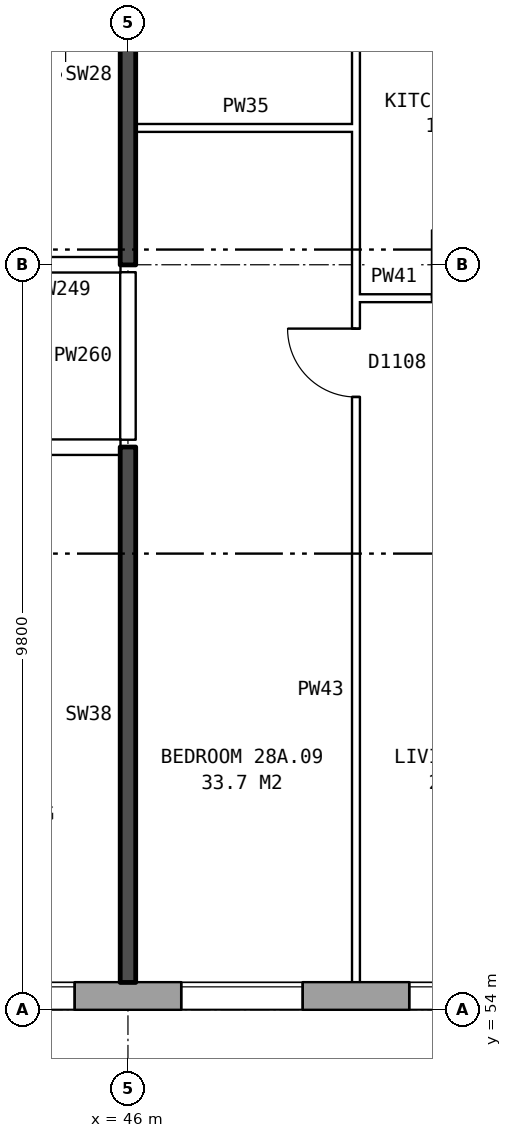
"""IFC4 building model, lengths in metres.
Left out: names, types, materials, properties, quantities, classifications, styles, units other than length and angle.
Written with IfcOpenShell. Run it as: python <this file> out.ifc"""

import sys

from ifc_helpers import new_model, si_unit, direction, frame, frame_2d, origin, place, context, subcontext, project, spatial, rectangle, extrude, element, fill, save


model = new_model("IFC4")
c1 = context("Model", 3, precision=1e-05, world=origin(), true_north=direction((0.0, 1.0)))
c2 = subcontext(c1, "Body", "Model", "MODEL_VIEW")
j1 = project(units=[si_unit("LENGTHUNIT", "METRE"), si_unit("PLANEANGLEUNIT", "RADIAN")], contexts=[c1])
p1 = place(None, origin())
s1 = spatial("IfcSite", under=j1, at=p1, CompositionType="ELEMENT")
p2 = place(p1, origin())
s2 = spatial("IfcBuilding", under=s1, at=p2, CompositionType="ELEMENT")
p3 = place(p2, frame((0.0, 0.0, 102.6)))
s3 = spatial("IfcBuildingStorey", under=s2, at=p3, CompositionType="ELEMENT", Elevation=102.6)
p4 = place(p3, frame((28.075, 54.18, 0.0), z_axis=(0.0, 0.0, 1.0), x_axis=(1.0, 0.0, 0.0)))
e1 = element("IfcWall", 1, at=p4, inside=s3, PredefinedType="STANDARD", context=c2, shape_type="SweptSolid", body=[
    extrude(rectangle(XDim=44.851, YDim=0.36, at=frame_2d((22.425, 0.0))), origin(), (0.0, 0.0, 1.0), 2.85),
])
p5 = place(p4, frame((0.625, 0.0, 0.8)))
e2 = element("IfcOpeningElement", 2, at=p5, cuts=e1, PredefinedType="OPENING", context=c2, shape_type="SweptSolid", body=[
    extrude(rectangle(XDim=1.6, YDim=1.8, at=frame_2d((0.8, 0.9))), frame((0.0, 0.19, 0.0), z_axis=(0.0, -1.0, 0.0), x_axis=(1.0, 0.0, 0.0)), (0.0, 0.0, 1.0), 0.38),
])
p6 = place(p4, frame((3.625, 0.0, 0.8)))
e3 = element("IfcOpeningElement", 3, at=p6, cuts=e1, PredefinedType="OPENING", context=c2, shape_type="SweptSolid", body=[
    extrude(rectangle(XDim=1.6, YDim=1.8, at=frame_2d((0.8, 0.9))), frame((0.0, 0.19, 0.0), z_axis=(0.0, -1.0, 0.0), x_axis=(1.0, 0.0, 0.0)), (0.0, 0.0, 1.0), 0.38),
])
p7 = place(p4, frame((6.125, 0.0, 1.0)))
e4 = element("IfcOpeningElement", 4, at=p7, cuts=e1, PredefinedType="OPENING", context=c2, shape_type="SweptSolid", body=[
    extrude(rectangle(XDim=0.6, YDim=1.5, at=frame_2d((0.3, 0.75))), frame((0.0, 0.19, 0.0), z_axis=(0.0, -1.0, 0.0), x_axis=(1.0, 0.0, 0.0)), (0.0, 0.0, 1.0), 0.38),
])
p8 = place(p4, frame((7.025, 0.0, 1.7)))
e5 = element("IfcOpeningElement", 5, at=p8, cuts=e1, PredefinedType="OPENING", context=c2, shape_type="SweptSolid", body=[
    extrude(rectangle(XDim=0.6, YDim=0.9, at=frame_2d((0.3, 0.45))), frame((0.0, 0.19, 0.0), z_axis=(0.0, -1.0, 0.0), x_axis=(1.0, 0.0, 0.0)), (0.0, 0.0, 1.0), 0.38),
])
p9 = place(p4, frame((12.625, 0.0, 0.8)))
e6 = element("IfcOpeningElement", 6, at=p9, cuts=e1, PredefinedType="OPENING", context=c2, shape_type="SweptSolid", body=[
    extrude(rectangle(XDim=1.6, YDim=1.8, at=frame_2d((0.8, 0.9))), frame((0.0, 0.19, 0.0), z_axis=(0.0, -1.0, 0.0), x_axis=(1.0, 0.0, 0.0)), (0.0, 0.0, 1.0), 0.38),
])
p10 = place(p4, frame((15.625, 0.0, 0.8)))
e7 = element("IfcOpeningElement", 7, at=p10, cuts=e1, PredefinedType="OPENING", context=c2, shape_type="SweptSolid", body=[
    extrude(rectangle(XDim=1.6, YDim=1.8, at=frame_2d((0.8, 0.9))), frame((0.0, 0.19, 0.0), z_axis=(0.0, -1.0, 0.0), x_axis=(1.0, 0.0, 0.0)), (0.0, 0.0, 1.0), 0.38),
])
p11 = place(p4, frame((18.625, 0.0, 0.8)))
e8 = element("IfcOpeningElement", 8, at=p11, cuts=e1, PredefinedType="OPENING", context=c2, shape_type="SweptSolid", body=[
    extrude(rectangle(XDim=1.6, YDim=1.8, at=frame_2d((0.8, 0.9))), frame((0.0, 0.19, 0.0), z_axis=(0.0, -1.0, 0.0), x_axis=(1.0, 0.0, 0.0)), (0.0, 0.0, 1.0), 0.38),
])
p12 = place(p4, frame((21.625, 0.0, 0.8)))
e9 = element("IfcOpeningElement", 9, at=p12, cuts=e1, PredefinedType="OPENING", context=c2, shape_type="SweptSolid", body=[
    extrude(rectangle(XDim=1.6, YDim=1.8, at=frame_2d((0.8, 0.9))), frame((0.0, 0.19, 0.0), z_axis=(0.0, -1.0, 0.0), x_axis=(1.0, 0.0, 0.0)), (0.0, 0.0, 1.0), 0.38),
])
p13 = place(p4, frame((24.625, 0.0, 0.8)))
e10 = element("IfcOpeningElement", 10, at=p13, cuts=e1, PredefinedType="OPENING", context=c2, shape_type="SweptSolid", body=[
    extrude(rectangle(XDim=1.6, YDim=1.8, at=frame_2d((0.8, 0.9))), frame((0.0, 0.19, 0.0), z_axis=(0.0, -1.0, 0.0), x_axis=(1.0, 0.0, 0.0)), (0.0, 0.0, 1.0), 0.38),
])
p14 = place(p4, frame((27.625, 0.0, 0.8)))
e11 = element("IfcOpeningElement", 11, at=p14, cuts=e1, PredefinedType="OPENING", context=c2, shape_type="SweptSolid", body=[
    extrude(rectangle(XDim=1.6, YDim=1.8, at=frame_2d((0.8, 0.9))), frame((0.0, 0.19, 0.0), z_axis=(0.0, -1.0, 0.0), x_axis=(1.0, 0.0, 0.0)), (0.0, 0.0, 1.0), 0.38),
])
p15 = place(p4, frame((30.625, 0.0, 0.8)))
e12 = element("IfcOpeningElement", 12, at=p15, cuts=e1, PredefinedType="OPENING", context=c2, shape_type="SweptSolid", body=[
    extrude(rectangle(XDim=1.6, YDim=1.8, at=frame_2d((0.8, 0.9))), frame((0.0, 0.19, 0.0), z_axis=(0.0, -1.0, 0.0), x_axis=(1.0, 0.0, 0.0)), (0.0, 0.0, 1.0), 0.38),
])
p16 = place(p4, frame((33.075, 0.0, 0.8)))
e13 = element("IfcOpeningElement", 13, at=p16, cuts=e1, PredefinedType="OPENING", context=c2, shape_type="SweptSolid", body=[
    extrude(rectangle(XDim=1.6, YDim=1.8, at=frame_2d((0.8, 0.9))), frame((0.0, 0.19, 0.0), z_axis=(0.0, -1.0, 0.0), x_axis=(1.0, 0.0, 0.0)), (0.0, 0.0, 1.0), 0.38),
])
p17 = place(p4, frame((37.175, 0.0, 1.7)))
e14 = element("IfcOpeningElement", 14, at=p17, cuts=e1, PredefinedType="OPENING", context=c2, shape_type="SweptSolid", body=[
    extrude(rectangle(XDim=1.0, YDim=0.9, at=frame_2d((0.5, 0.45))), frame((0.0, 0.19, 0.0), z_axis=(0.0, -1.0, 0.0), x_axis=(1.0, 0.0, 0.0)), (0.0, 0.0, 1.0), 0.38),
])
p18 = place(p4, frame((39.625, 0.0, 0.8)))
e15 = element("IfcOpeningElement", 15, at=p18, cuts=e1, PredefinedType="OPENING", context=c2, shape_type="SweptSolid", body=[
    extrude(rectangle(XDim=1.6, YDim=1.8, at=frame_2d((0.8, 0.9))), frame((0.0, 0.19, 0.0), z_axis=(0.0, -1.0, 0.0), x_axis=(1.0, 0.0, 0.0)), (0.0, 0.0, 1.0), 0.38),
])
p19 = place(p4, frame((42.625, 0.0, 0.8)))
e16 = element("IfcOpeningElement", 16, at=p19, cuts=e1, PredefinedType="OPENING", context=c2, shape_type="SweptSolid", body=[
    extrude(rectangle(XDim=1.6, YDim=1.8, at=frame_2d((0.8, 0.9))), frame((0.0, 0.19, 0.0), z_axis=(0.0, -1.0, 0.0), x_axis=(1.0, 0.0, 0.0)), (0.0, 0.0, 1.0), 0.38),
])
p20 = place(p4, frame((8.925, 0.0, 0.8)))
e17 = element("IfcOpeningElement", 17, at=p20, cuts=e1, PredefinedType="OPENING", context=c2, shape_type="SweptSolid", body=[
    extrude(rectangle(XDim=1.0, YDim=0.9, at=frame_2d((0.5, 0.45))), frame((0.0, 0.19, 0.0), z_axis=(0.0, -1.0, 0.0), x_axis=(1.0, 0.0, 0.0)), (0.0, 0.0, 1.0), 0.38),
])
p21 = place(p4, frame((10.225, 0.0, 0.8)))
e18 = element("IfcOpeningElement", 18, at=p21, cuts=e1, PredefinedType="OPENING", context=c2, shape_type="SweptSolid", body=[
    extrude(rectangle(XDim=1.4, YDim=1.8, at=frame_2d((0.7, 0.9))), frame((0.0, 0.19, 0.0), z_axis=(0.0, -1.0, 0.0), x_axis=(1.0, 0.0, 0.0)), (0.0, 0.0, 1.0), 0.38),
])
p22 = place(p4, frame((34.975, 0.0, 0.8)))
e19 = element("IfcOpeningElement", 19, at=p22, cuts=e1, PredefinedType="OPENING", context=c2, shape_type="SweptSolid", body=[
    extrude(rectangle(XDim=0.6, YDim=0.9, at=frame_2d((0.3, 0.45))), frame((0.0, 0.19, 0.0), z_axis=(0.0, -1.0, 0.0), x_axis=(1.0, 0.0, 0.0)), (0.0, 0.0, 1.0), 0.38),
])
p23 = place(p4, frame((38.475, 0.0, 0.8)))
e20 = element("IfcOpeningElement", 20, at=p23, cuts=e1, PredefinedType="OPENING", context=c2, shape_type="SweptSolid", body=[
    extrude(rectangle(XDim=0.8, YDim=1.8, at=frame_2d((0.4, 0.9))), frame((0.0, 0.19, 0.0), z_axis=(0.0, -1.0, 0.0), x_axis=(1.0, 0.0, 0.0)), (0.0, 0.0, 1.0), 0.38),
])
p24 = place(p3, frame((25.36, 61.4, 0.0), z_axis=(0.0, 0.0, 1.0), x_axis=(1.0, 0.0, 0.0)))
e21 = element("IfcWall", 21, at=p24, inside=s3, PredefinedType="PARTITIONING", context=c2, shape_type="SweptSolid", body=[
    extrude(rectangle(XDim=20.54, YDim=0.2, at=frame_2d((10.27, 0.0))), origin(), (0.0, 0.0, 1.0), 2.85),
])
p25 = place(p24, frame((18.09, 0.0, 0.0)))
e22 = element("IfcOpeningElement", 22, at=p25, cuts=e21, PredefinedType="OPENING", context=c2, shape_type="SweptSolid", body=[
    extrude(rectangle(XDim=1.0, YDim=2.1, at=frame_2d((0.5, 1.05))), frame((0.0, 0.11, 0.0), z_axis=(0.0, -1.0, 0.0), x_axis=(1.0, 0.0, 0.0)), (0.0, 0.0, 1.0), 0.22),
])
p26 = place(p24, frame((12.14, 0.0, 0.0)))
e23 = element("IfcOpeningElement", 23, at=p26, cuts=e21, PredefinedType="OPENING", context=c2, shape_type="SweptSolid", body=[
    extrude(rectangle(XDim=1.0, YDim=2.1, at=frame_2d((0.5, 1.05))), frame((0.0, 0.11, 0.0), z_axis=(0.0, -1.0, 0.0), x_axis=(1.0, 0.0, 0.0)), (0.0, 0.0, 1.0), 0.22),
])
p27 = place(p24, frame((2.62, 0.0, 0.0)))
e24 = element("IfcOpeningElement", 24, at=p27, cuts=e21, PredefinedType="OPENING", context=c2, shape_type="SweptSolid", body=[
    extrude(rectangle(XDim=1.0, YDim=2.1, at=frame_2d((0.5, 1.05))), frame((0.0, 0.11, 0.0), z_axis=(0.0, -1.0, 0.0), x_axis=(1.0, 0.0, 0.0)), (0.0, 0.0, 1.0), 0.22),
])
p28 = place(p3, frame((49.0, 63.36, 0.0), z_axis=(0.0, 0.0, 1.0), x_axis=(1.0, 0.0, 0.0)))
e25 = element("IfcWall", 25, at=p28, inside=s3, PredefinedType="PARTITIONING", context=c2, shape_type="SweptSolid", body=[
    extrude(rectangle(XDim=2.9, YDim=0.1, at=frame_2d((1.45, 0.0))), origin(), (0.0, 0.0, 1.0), 2.85),
])
p29 = place(p28, frame((1.0, 0.0, 0.0)))
e26 = element("IfcOpeningElement", 26, at=p29, cuts=e25, PredefinedType="OPENING", context=c2, shape_type="SweptSolid", body=[
    extrude(rectangle(XDim=0.9, YDim=2.1, at=frame_2d((0.45, 1.05))), frame((0.0, 0.06, 0.0), z_axis=(0.0, -1.0, 0.0), x_axis=(1.0, 0.0, 0.0)), (0.0, 0.0, 1.0), 0.12),
])
p30 = place(p3, frame((44.36, 63.8, 0.0), z_axis=(0.0, 0.0, 1.0), x_axis=(1.0, 0.0, 0.0)))
e27 = element("IfcWall", 27, at=p30, inside=s3, PredefinedType="PARTITIONING", context=c2, shape_type="SweptSolid", body=[
    extrude(rectangle(XDim=1.54, YDim=0.2, at=frame_2d((0.77, 0.0))), origin(), (0.0, 0.0, 1.0), 2.85),
])
p31 = place(p3, frame((46.1, 65.6, 0.0), z_axis=(0.0, 0.0, 1.0), x_axis=(1.0, 0.0, 0.0)))
e28 = element("IfcWall", 28, at=p31, inside=s3, PredefinedType="PARTITIONING", context=c2, shape_type="SweptSolid", body=[
    extrude(rectangle(XDim=2.9, YDim=0.1, at=frame_2d((1.45, 0.0))), origin(), (0.0, 0.0, 1.0), 2.85),
])
p32 = place(p3, frame((46.0, 54.36, 0.0), z_axis=(0.0, 0.0, 1.0), x_axis=(0.0, 1.0, 0.0)))
e29 = element("IfcWall", 29, at=p32, inside=s3, PredefinedType="SOLIDWALL", context=c2, shape_type="SweptSolid", body=[
    extrude(rectangle(XDim=7.04, YDim=0.2, at=frame_2d((3.52, 0.0))), origin(), (0.0, 0.0, 1.0), 2.85),
])
p33 = place(p3, frame((46.0, 61.5, 0.0), z_axis=(0.0, 0.0, 1.0), x_axis=(0.0, 1.0, 0.0)))
e30 = element("IfcWall", 30, at=p33, inside=s3, PredefinedType="PARTITIONING", context=c2, shape_type="SweptSolid", body=[
    extrude(rectangle(XDim=2.2, YDim=0.2, at=frame_2d((1.1, 0.0))), origin(), (0.0, 0.0, 1.0), 2.85),
])
p34 = place(p3, frame((46.0, 63.8, 0.0), z_axis=(0.0, 0.0, 1.0), x_axis=(0.0, 1.0, 0.0)))
e31 = element("IfcWall", 31, at=p34, inside=s3, PredefinedType="SOLIDWALL", context=c2, shape_type="SweptSolid", body=[
    extrude(rectangle(XDim=5.0, YDim=0.2, at=frame_2d((2.5, 0.0))), origin(), (0.0, 0.0, 1.0), 2.85),
])
p35 = place(p3, frame((49.0, 54.36, 0.0), z_axis=(0.0, 0.0, 1.0), x_axis=(0.0, 1.0, 0.0)))
e32 = element("IfcWall", 32, at=p35, inside=s3, PredefinedType="PARTITIONING", context=c2, shape_type="SweptSolid", body=[
    extrude(rectangle(XDim=14.34, YDim=0.1, at=frame_2d((7.17, 0.0))), origin(), (0.0, 0.0, 1.0), 2.85),
])
p36 = place(p35, frame((7.7, 0.0, 0.0)))
e33 = element("IfcOpeningElement", 33, at=p36, cuts=e32, PredefinedType="OPENING", context=c2, shape_type="SweptSolid", body=[
    extrude(rectangle(XDim=0.9, YDim=2.1, at=frame_2d((0.45, 1.05))), frame((0.0, 0.06, 0.0), z_axis=(0.0, -1.0, 0.0), x_axis=(1.0, 0.0, 0.0)), (0.0, 0.0, 1.0), 0.12),
])
p37 = place(p35, frame((13.04, 0.0, 0.0)))
e34 = element("IfcOpeningElement", 34, at=p37, cuts=e32, PredefinedType="OPENING", context=c2, shape_type="SweptSolid", body=[
    extrude(rectangle(XDim=0.9, YDim=2.1, at=frame_2d((0.45, 1.05))), frame((0.0, 0.06, 0.0), z_axis=(0.0, -1.0, 0.0), x_axis=(1.0, 0.0, 0.0)), (0.0, 0.0, 1.0), 0.12),
])
p38 = place(p10, origin())
e35 = element("IfcWindow", 35, at=p38, inside=s3, PartitioningType="SINGLE_PANEL", PredefinedType="WINDOW", context=c2, shape_type="SweptSolid", body=[
    extrude(rectangle(XDim=1.6, YDim=1.8, at=frame_2d((0.8, 0.9))), frame((0.0, 0.15, 0.0), z_axis=(0.0, -1.0, 0.0), x_axis=(1.0, 0.0, 0.0)), (0.0, 0.0, 1.0), 0.06),
])
fill(e7, e35)
p39 = place(p11, origin())
e36 = element("IfcWindow", 36, at=p39, inside=s3, PartitioningType="SINGLE_PANEL", PredefinedType="WINDOW", context=c2, shape_type="SweptSolid", body=[
    extrude(rectangle(XDim=1.6, YDim=1.8, at=frame_2d((0.8, 0.9))), frame((0.0, 0.15, 0.0), z_axis=(0.0, -1.0, 0.0), x_axis=(1.0, 0.0, 0.0)), (0.0, 0.0, 1.0), 0.06),
])
fill(e8, e36)
p40 = place(p12, origin())
e37 = element("IfcWindow", 37, at=p40, inside=s3, PartitioningType="SINGLE_PANEL", PredefinedType="WINDOW", context=c2, shape_type="SweptSolid", body=[
    extrude(rectangle(XDim=1.6, YDim=1.8, at=frame_2d((0.8, 0.9))), frame((0.0, 0.15, 0.0), z_axis=(0.0, -1.0, 0.0), x_axis=(1.0, 0.0, 0.0)), (0.0, 0.0, 1.0), 0.06),
])
fill(e9, e37)
p41 = place(p36, origin())
e38 = element("IfcDoor", 38, at=p41, inside=s3, OperationType="SINGLE_SWING_RIGHT", PredefinedType="DOOR", context=c2, shape_type="SweptSolid", body=[
    extrude(rectangle(XDim=0.9, YDim=2.1, at=frame_2d((0.45, 1.05))), frame((0.0, 0.025, 0.0), z_axis=(0.0, -1.0, 0.0), x_axis=(1.0, 0.0, 0.0)), (0.0, 0.0, 1.0), 0.05),
])
fill(e33, e38)
save(model, sys.argv[1])
